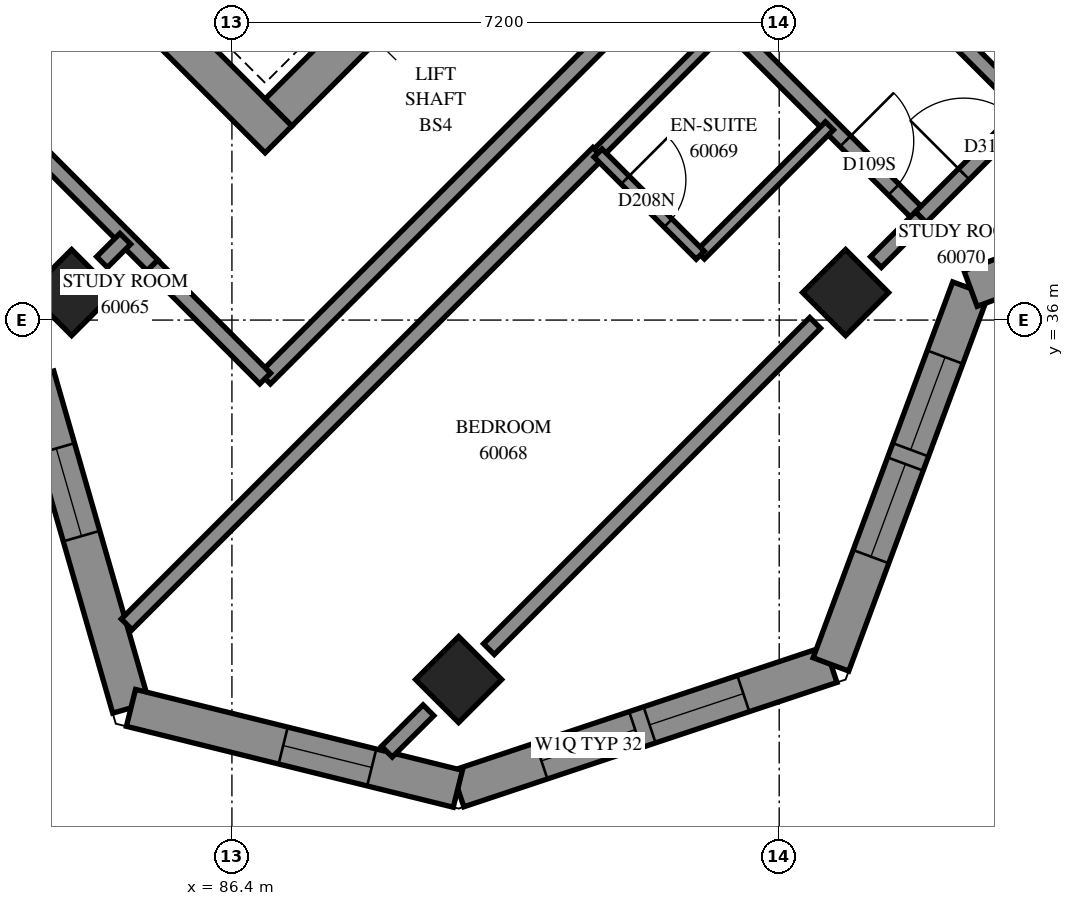
"""IFC4 building model, lengths in metres.
Left out: names, types, materials, properties, quantities, classifications, styles, units other than length and angle.
Written with IfcOpenShell. Run it as: python <this file> out.ifc"""

import sys

from ifc_helpers import new_model, si_unit, direction, frame, frame_2d, origin, origin_2d, place, context, subcontext, project, spatial, polyline, rectangle, outline, extrude, element, fill, save


model = new_model("IFC4")
c1 = context("Model", 3, precision=1e-05, world=origin(), true_north=direction((0.0, 1.0)))
c2 = subcontext(c1, "Body", "Model", "MODEL_VIEW")
j1 = project(units=[si_unit("LENGTHUNIT", "METRE"), si_unit("PLANEANGLEUNIT", "RADIAN")], contexts=[c1])
p1 = place(None, origin())
s1 = spatial("IfcSite", under=j1, at=p1, CompositionType="ELEMENT")
p2 = place(p1, origin())
s2 = spatial("IfcBuilding", under=s1, at=p2, CompositionType="ELEMENT")
p3 = place(p2, frame((0.0, 0.0, 220.2)))
s3 = spatial("IfcBuildingStorey", under=s2, at=p3, CompositionType="ELEMENT", Elevation=220.2)
for number, where, z_axis, x_axis in (
    (1, (84.291, 36.362, 0.0), (0.0, 0.0, 1.0), (0.707, -0.707, 0.0)),
    (2, (94.474, 36.362, 0.0), (0.0, 0.0, 1.0), (0.707, -0.707, 0.0)),
    (3, (89.382, 31.271, 0.0), (0.0, 0.0, 1.0), (0.707, -0.707, 0.0)),
):
    element("IfcColumn", number, at=place(p3, frame(where, z_axis=z_axis, x_axis=x_axis)), inside=s3, PredefinedType="COLUMN", context=c2, shape_type="SweptSolid", body=[
        extrude(rectangle(XDim=0.8, YDim=0.8, at=origin_2d()), origin(), (0.0, 0.0, 1.0), 3.1),
    ])
p4 = place(p3, frame((76.124, 49.267, -0.3), z_axis=(0.0, 0.0, 1.0), x_axis=(0.7071067812, -0.7071067812, 0.0)))
e4 = element("IfcWall", 4, at=p4, inside=s3, PredefinedType="SHEAR", context=c2, shape_type="SweptSolid", body=[
    extrude(rectangle(XDim=15.4, YDim=0.5, at=frame_2d((7.7, 0.0))), origin(), (0.0, 0.0, 1.0), 2.7),
])
p5 = place(p3, frame((87.013, 38.731, -0.3), z_axis=(0.0, 0.0, 1.0), x_axis=(0.7071067812, 0.7071067812, 0.0)))
e5 = element("IfcWall", 5, at=p5, inside=s3, PredefinedType="SHEAR", context=c2, shape_type="SweptSolid", body=[
    extrude(rectangle(XDim=14.4, YDim=0.5, at=frame_2d((7.2, 0.0))), origin(), (0.0, 0.0, 1.0), 2.7),
])
p6 = place(p5, frame((4.55, 0.0, 0.3)))
e6 = element("IfcOpeningElement", 6, at=p6, cuts=e5, PredefinedType="OPENING", context=c2, shape_type="SweptSolid", body=[
    extrude(rectangle(XDim=1.1, YDim=2.1, at=frame_2d((0.55, 1.05))), frame((0.0, 0.26, 0.0), z_axis=(0.0, -1.0, 0.0), x_axis=(1.0, 0.0, 0.0)), (0.0, 0.0, 1.0), 0.52),
])
p7 = place(p5, frame((11.35, 0.0, 0.3)))
e7 = element("IfcOpeningElement", 7, at=p7, cuts=e5, PredefinedType="OPENING", context=c2, shape_type="SweptSolid", body=[
    extrude(rectangle(XDim=1.1, YDim=2.1, at=frame_2d((0.55, 1.05))), frame((0.0, 0.26, 0.0), z_axis=(0.0, -1.0, 0.0), x_axis=(1.0, 0.0, 0.0)), (0.0, 0.0, 1.0), 0.52),
])
p8 = place(p3, frame((89.372, 29.834, 0.0), z_axis=(0.0, 0.0, 1.0), x_axis=(0.9486871632, 0.3162161702, 0.0)))
e8 = element("IfcWall", 8, at=p8, inside=s3, PredefinedType="SOLIDWALL", context=c2, shape_type="SweptSolid", body=[
    extrude(outline(polyline([(-0.072, -0.25), (5.294, -0.25), (5.055, 0.25), (0.072, 0.25), (-0.072, -0.25)])), origin(), (0.0, 0.0, 1.0), 3.1),
])
p9 = place(p8, frame((1.159, 0.0, 0.45)))
e9 = element("IfcOpeningElement", 9, at=p9, cuts=e8, PredefinedType="OPENING", context=c2, shape_type="SweptSolid", body=[
    extrude(rectangle(XDim=1.3, YDim=2.5, at=frame_2d((0.65, 1.25))), frame((0.0, 0.26, 0.0), z_axis=(0.0, -1.0, 0.0), x_axis=(1.0, 0.0, 0.0)), (0.0, 0.0, 1.0), 0.52),
])
p10 = place(p8, frame((2.659, 0.0, 0.45)))
e10 = element("IfcOpeningElement", 10, at=p10, cuts=e8, PredefinedType="OPENING", context=c2, shape_type="SweptSolid", body=[
    extrude(rectangle(XDim=1.3, YDim=2.5, at=frame_2d((0.65, 1.25))), frame((0.0, 0.26, 0.0), z_axis=(0.0, -1.0, 0.0), x_axis=(1.0, 0.0, 0.0)), (0.0, 0.0, 1.0), 0.52),
])
p11 = place(p3, frame((94.281, 31.47, 0.0), z_axis=(0.0, 0.0, 1.0), x_axis=(0.3481903374, 0.9374238577, 0.0)))
e11 = element("IfcWall", 11, at=p11, inside=s3, PredefinedType="SOLIDWALL", context=c2, shape_type="SweptSolid", body=[
    extrude(outline(polyline([(-0.12, -0.25), (5.16, -0.25), (5.39, 0.25), (0.12, 0.25), (-0.12, -0.25)])), origin(), (0.0, 0.0, 1.0), 3.1),
])
p12 = place(p11, frame((1.512, 0.0, 0.45)))
e12 = element("IfcOpeningElement", 12, at=p12, cuts=e11, PredefinedType="OPENING", context=c2, shape_type="SweptSolid", body=[
    extrude(rectangle(XDim=1.3, YDim=2.5, at=frame_2d((0.65, 1.25))), frame((0.0, 0.26, 0.0), z_axis=(0.0, -1.0, 0.0), x_axis=(1.0, 0.0, 0.0)), (0.0, 0.0, 1.0), 0.52),
])
p13 = place(p11, frame((3.012, 0.0, 0.45)))
e13 = element("IfcOpeningElement", 13, at=p13, cuts=e11, PredefinedType="OPENING", context=c2, shape_type="SweptSolid", body=[
    extrude(rectangle(XDim=1.3, YDim=2.5, at=frame_2d((0.65, 1.25))), frame((0.0, 0.26, 0.0), z_axis=(0.0, -1.0, 0.0), x_axis=(1.0, 0.0, 0.0)), (0.0, 0.0, 1.0), 0.52),
])
p14 = place(p3, frame((96.118, 36.415, 0.0), z_axis=(0.0, 0.0, 1.0), x_axis=(0.9374238577, 0.3481903374, 0.0)))
e14 = element("IfcWall", 14, at=p14, inside=s3, PredefinedType="SOLIDWALL", context=c2, shape_type="SweptSolid", body=[
    extrude(outline(polyline([(0.115, -0.25), (5.395, -0.25), (5.155, 0.25), (-0.115, 0.25), (0.115, -0.25)])), origin(), (0.0, 0.0, 1.0), 3.1),
])
p15 = place(p14, frame((1.655, 0.0, 0.45)))
e15 = element("IfcOpeningElement", 15, at=p15, cuts=e14, PredefinedType="OPENING", context=c2, shape_type="SweptSolid", body=[
    extrude(rectangle(XDim=1.3, YDim=2.5, at=frame_2d((0.65, 1.25))), frame((0.0, 0.26, 0.0), z_axis=(0.0, -1.0, 0.0), x_axis=(1.0, 0.0, 0.0)), (0.0, 0.0, 1.0), 0.52),
])
p16 = place(p14, frame((3.155, 0.0, 0.45)))
e16 = element("IfcOpeningElement", 16, at=p16, cuts=e14, PredefinedType="OPENING", context=c2, shape_type="SweptSolid", body=[
    extrude(rectangle(XDim=1.3, YDim=2.5, at=frame_2d((0.65, 1.25))), frame((0.0, 0.26, 0.0), z_axis=(0.0, -1.0, 0.0), x_axis=(1.0, 0.0, 0.0)), (0.0, 0.0, 1.0), 0.52),
])
p17 = place(p3, frame((83.816, 35.261, 0.0), z_axis=(0.0, 0.0, 1.0), x_axis=(0.2766636526, -0.960966817, 0.0)))
e17 = element("IfcWall", 17, at=p17, inside=s3, PredefinedType="SOLIDWALL", context=c2, shape_type="SweptSolid", body=[
    extrude(outline(polyline([(0.138, -0.25), (4.685, -0.25), (4.396, 0.25), (-0.138, 0.25), (0.138, -0.25)])), origin(), (0.0, 0.0, 1.0), 3.1),
])
p18 = place(p17, frame((0.989, 0.0, 0.45)))
e18 = element("IfcOpeningElement", 18, at=p18, cuts=e17, PredefinedType="OPENING", context=c2, shape_type="SweptSolid", body=[
    extrude(rectangle(XDim=1.2, YDim=2.5, at=frame_2d((0.6, 1.25))), frame((0.0, 0.26, 0.0), z_axis=(0.0, -1.0, 0.0), x_axis=(1.0, 0.0, 0.0)), (0.0, 0.0, 1.0), 0.52),
])
p19 = place(p3, frame((85.072, 30.898, 0.0), z_axis=(0.0, 0.0, 1.0), x_axis=(0.9707042236, -0.2402775693, 0.0)))
e19 = element("IfcWall", 19, at=p19, inside=s3, PredefinedType="SOLIDWALL", context=c2, shape_type="SweptSolid", body=[
    extrude(outline(polyline([(-0.144, -0.25), (4.502, -0.25), (4.357, 0.25), (0.144, 0.25), (-0.144, -0.25)])), origin(), (0.0, 0.0, 1.0), 3.1),
])
p20 = place(p19, frame((2.063, 0.0, 0.45)))
e20 = element("IfcOpeningElement", 20, at=p20, cuts=e19, PredefinedType="OPENING", context=c2, shape_type="SweptSolid", body=[
    extrude(rectangle(XDim=1.2, YDim=2.5, at=frame_2d((0.6, 1.25))), frame((0.0, 0.26, 0.0), z_axis=(0.0, -1.0, 0.0), x_axis=(1.0, 0.0, 0.0)), (0.0, 0.0, 1.0), 0.52),
])
p21 = place(p3, frame((85.016, 31.997, 0.0), z_axis=(0.0, 0.0, 1.0), x_axis=(0.7071067812, 0.7071067812, 0.0)))
e21 = element("IfcWall", 21, at=p21, inside=s3, PredefinedType="PARTITIONING", context=c2, shape_type="SweptSolid", body=[
    extrude(rectangle(XDim=8.773, YDim=0.2, at=frame_2d((4.387, 0.0))), origin(), (0.0, 0.0, 1.0), 3.1),
])
p22 = place(p3, frame((86.835, 35.231, 0.0), z_axis=(0.0, 0.0, 1.0), x_axis=(0.7071067812, 0.7071067812, 0.0)))
e22 = element("IfcWall", 22, at=p22, inside=s3, PredefinedType="PARTITIONING", context=c2, shape_type="SweptSolid", body=[
    extrude(rectangle(XDim=7.6, YDim=0.2, at=frame_2d((3.8, 0.0))), origin(), (0.0, 0.0, 1.0), 3.1),
])
p23 = place(p22, frame((6.346, 0.0, 0.0)))
e23 = element("IfcOpeningElement", 23, at=p23, cuts=e22, PredefinedType="OPENING", context=c2, shape_type="SweptSolid", body=[
    extrude(rectangle(XDim=1.0, YDim=2.1, at=frame_2d((0.5, 1.05))), frame((0.0, 0.11, 0.0), z_axis=(0.0, -1.0, 0.0), x_axis=(1.0, 0.0, 0.0)), (0.0, 0.0, 1.0), 0.22),
])
p24 = place(p3, frame((80.522, 41.553, 0.0), z_axis=(0.0, 0.0, 1.0), x_axis=(0.7071067812, -0.7071067812, 0.0)))
e24 = element("IfcWall", 24, at=p24, inside=s3, PredefinedType="PARTITIONING", context=c2, shape_type="SweptSolid", body=[
    extrude(rectangle(XDim=6.836, YDim=0.2, at=frame_2d((3.418, 0.0))), origin(), (0.0, 0.0, 1.0), 3.1),
])
p25 = place(p3, frame((89.781, 31.671, 0.0), z_axis=(0.0, 0.0, 1.0), x_axis=(0.7071067812, 0.7071067812, 0.0)))
e25 = element("IfcWall", 25, at=p25, inside=s3, PredefinedType="PARTITIONING", context=c2, shape_type="SweptSolid", body=[
    extrude(rectangle(XDim=6.07, YDim=0.2, at=frame_2d((3.035, 0.0))), origin(), (0.0, 0.0, 1.0), 2.6),
])
p26 = place(p3, frame((93.623, 42.015, 0.0), z_axis=(0.0, 0.0, 1.0), x_axis=(0.7071067812, -0.7071067812, 0.0)))
e26 = element("IfcWall", 26, at=p26, inside=s3, PredefinedType="PARTITIONING", context=c2, shape_type="SweptSolid", body=[
    extrude(rectangle(XDim=4.599, YDim=0.2, at=frame_2d((2.3, 0.0))), origin(), (0.0, 0.0, 1.0), 3.1),
])
p27 = place(p26, frame((1.349, 0.0, 0.0)))
e27 = element("IfcOpeningElement", 27, at=p27, cuts=e26, PredefinedType="OPENING", context=c2, shape_type="SweptSolid", body=[
    extrude(rectangle(XDim=0.9, YDim=2.1, at=frame_2d((0.45, 1.05))), frame((0.0, 0.11, 0.0), z_axis=(0.0, -1.0, 0.0), x_axis=(1.0, 0.0, 0.0)), (0.0, 0.0, 1.0), 0.22),
])
p28 = place(p3, frame((92.216, 40.608, 0.0), z_axis=(0.0, 0.0, 1.0), x_axis=(0.7071067812, -0.7071067812, 0.0)))
e28 = element("IfcWall", 28, at=p28, inside=s3, PredefinedType="PARTITIONING", context=c2, shape_type="SweptSolid", body=[
    extrude(rectangle(XDim=4.599, YDim=0.2, at=frame_2d((2.3, 0.0))), origin(), (0.0, 0.0, 1.0), 3.1),
])
p29 = place(p28, frame((3.189, 0.0, 0.0)))
e29 = element("IfcOpeningElement", 29, at=p29, cuts=e28, PredefinedType="OPENING", context=c2, shape_type="SweptSolid", body=[
    extrude(rectangle(XDim=0.9, YDim=2.1, at=frame_2d((0.45, 1.05))), frame((0.0, 0.11, 0.0), z_axis=(0.0, -1.0, 0.0), x_axis=(1.0, 0.0, 0.0)), (0.0, 0.0, 1.0), 0.22),
])
for number, where, z_axis, x_axis in (
    (30, (92.563, 36.857, 0.0), (0.0, 0.0, 1.0), (0.707, 0.707, 0.0)),
    (31, (91.219, 38.201, 0.0), (0.0, 0.0, 1.0), (0.707, 0.707, 0.0)),
):
    element("IfcWall", number, at=place(p3, frame(where, z_axis=z_axis, x_axis=x_axis)), inside=s3, PredefinedType="PARTITIONING", context=c2, shape_type="SweptSolid", body=[
        extrude(rectangle(XDim=2.401, YDim=0.15, at=frame_2d((1.201, 0.0))), origin(), (0.0, 0.0, 1.0), 3.1),
    ])
p30 = place(p3, frame((85.353, 36.717, 0.0), z_axis=(0.0, 0.0, 1.0), x_axis=(0.7066304548, -0.7075827869, 0.0)))
e32 = element("IfcWall", 32, at=p30, inside=s3, PredefinedType="PARTITIONING", context=c2, shape_type="SweptSolid", body=[
    extrude(rectangle(XDim=2.1, YDim=0.2, at=frame_2d((1.05, 0.0))), origin(), (0.0, 0.0, 1.0), 3.1),
])
p31 = place(p3, frame((95.463, 37.353, 0.0), z_axis=(0.0, 0.0, 1.0), x_axis=(0.7071067812, 0.7071067812, 0.0)))
e33 = element("IfcWall", 33, at=p31, inside=s3, PredefinedType="PARTITIONING", context=c2, shape_type="SweptSolid", body=[
    extrude(rectangle(XDim=2.0, YDim=0.2, at=frame_2d((1.0, 0.0))), origin(), (0.0, 0.0, 1.0), 2.6),
])
p32 = place(p31, frame((0.802, 0.0, 0.0)))
e34 = element("IfcOpeningElement", 34, at=p32, cuts=e33, PredefinedType="OPENING", context=c2, shape_type="SweptSolid", body=[
    extrude(rectangle(XDim=1.0, YDim=2.1, at=frame_2d((0.5, 1.05))), frame((0.0, 0.11, 0.0), z_axis=(0.0, -1.0, 0.0), x_axis=(1.0, 0.0, 0.0)), (0.0, 0.0, 1.0), 0.22),
])
p33 = place(p3, frame((91.217, 38.197, 0.0), z_axis=(0.0, 0.0, 1.0), x_axis=(0.7071067812, -0.7071067812, 0.0)))
e35 = element("IfcWall", 35, at=p33, inside=s3, PredefinedType="PARTITIONING", context=c2, shape_type="SweptSolid", body=[
    extrude(rectangle(XDim=1.901, YDim=0.15, at=frame_2d((0.95, 0.0))), origin(), (0.0, 0.0, 1.0), 3.1),
])
p34 = place(p33, frame((0.502, 0.0, 0.0)))
e36 = element("IfcOpeningElement", 36, at=p34, cuts=e35, PredefinedType="OPENING", context=c2, shape_type="SweptSolid", body=[
    extrude(rectangle(XDim=0.8, YDim=2.1, at=frame_2d((0.4, 1.05))), frame((0.0, 0.085, 0.0), z_axis=(0.0, -1.0, 0.0), x_axis=(1.0, 0.0, 0.0)), (0.0, 0.0, 1.0), 0.17),
])
p35 = place(p3, frame((94.873, 36.763, 0.0), z_axis=(0.0, 0.0, 1.0), x_axis=(0.7071067812, 0.7071067812, 0.0)))
e37 = element("IfcWall", 37, at=p35, inside=s3, PredefinedType="PARTITIONING", context=c2, shape_type="SweptSolid", body=[
    extrude(rectangle(XDim=0.834, YDim=0.2, at=frame_2d((0.417, 0.0))), origin(), (0.0, 0.0, 1.0), 2.6),
])
p36 = place(p3, frame((88.439, 30.322, 0.0), z_axis=(0.0, 0.0, 1.0), x_axis=(0.7085960355, 0.7056143837, 0.0)))
e38 = element("IfcWall", 38, at=p36, inside=s3, PredefinedType="PARTITIONING", context=c2, shape_type="SweptSolid", body=[
    extrude(rectangle(XDim=0.771, YDim=0.2, at=frame_2d((0.386, 0.0))), origin(), (0.0, 0.0, 1.0), 3.1),
])
p37 = place(p3, frame((84.691, 36.763, 0.0), z_axis=(0.0, 0.0, 1.0), x_axis=(0.7071067812, 0.7071067812, 0.0)))
e39 = element("IfcWall", 39, at=p37, inside=s3, PredefinedType="PARTITIONING", context=c2, shape_type="SweptSolid", body=[
    extrude(rectangle(XDim=0.433, YDim=0.2, at=frame_2d((0.216, 0.0))), origin(), (0.0, 0.0, 1.0), 3.1),
])
p38 = place(p9, origin())
e40 = element("IfcWindow", 40, at=p38, inside=s3, PartitioningType="SINGLE_PANEL", PredefinedType="WINDOW", context=c2, shape_type="SweptSolid", body=[
    extrude(rectangle(XDim=1.3, YDim=2.5, at=frame_2d((0.65, 1.25))), frame((0.0, 0.18, 0.0), z_axis=(0.0, -1.0, 0.0), x_axis=(1.0, 0.0, 0.0)), (0.0, 0.0, 1.0), 0.06),
])
fill(e9, e40)
p39 = place(p10, origin())
e41 = element("IfcWindow", 41, at=p39, inside=s3, PartitioningType="SINGLE_PANEL", PredefinedType="WINDOW", context=c2, shape_type="SweptSolid", body=[
    extrude(rectangle(XDim=1.3, YDim=2.5, at=frame_2d((0.65, 1.25))), frame((0.0, 0.18, 0.0), z_axis=(0.0, -1.0, 0.0), x_axis=(1.0, 0.0, 0.0)), (0.0, 0.0, 1.0), 0.06),
])
fill(e10, e41)
p40 = place(p12, origin())
e42 = element("IfcWindow", 42, at=p40, inside=s3, PartitioningType="SINGLE_PANEL", PredefinedType="WINDOW", context=c2, shape_type="SweptSolid", body=[
    extrude(rectangle(XDim=1.3, YDim=2.5, at=frame_2d((0.65, 1.25))), frame((0.0, 0.18, 0.0), z_axis=(0.0, -1.0, 0.0), x_axis=(1.0, 0.0, 0.0)), (0.0, 0.0, 1.0), 0.06),
])
fill(e12, e42)
p41 = place(p13, origin())
e43 = element("IfcWindow", 43, at=p41, inside=s3, PartitioningType="SINGLE_PANEL", PredefinedType="WINDOW", context=c2, shape_type="SweptSolid", body=[
    extrude(rectangle(XDim=1.3, YDim=2.5, at=frame_2d((0.65, 1.25))), frame((0.0, 0.18, 0.0), z_axis=(0.0, -1.0, 0.0), x_axis=(1.0, 0.0, 0.0)), (0.0, 0.0, 1.0), 0.06),
])
fill(e13, e43)
p42 = place(p18, origin())
e44 = element("IfcWindow", 44, at=p42, inside=s3, PartitioningType="SINGLE_PANEL", PredefinedType="WINDOW", context=c2, shape_type="SweptSolid", body=[
    extrude(rectangle(XDim=1.2, YDim=2.5, at=frame_2d((0.6, 1.25))), frame((0.0, 0.18, 0.0), z_axis=(0.0, -1.0, 0.0), x_axis=(1.0, 0.0, 0.0)), (0.0, 0.0, 1.0), 0.06),
])
fill(e18, e44)
p43 = place(p20, origin())
e45 = element("IfcWindow", 45, at=p43, inside=s3, PartitioningType="SINGLE_PANEL", PredefinedType="WINDOW", context=c2, shape_type="SweptSolid", body=[
    extrude(rectangle(XDim=1.2, YDim=2.5, at=frame_2d((0.6, 1.25))), frame((0.0, 0.18, 0.0), z_axis=(0.0, -1.0, 0.0), x_axis=(1.0, 0.0, 0.0)), (0.0, 0.0, 1.0), 0.06),
])
fill(e20, e45)
p44 = place(p29, origin())
e46 = element("IfcDoor", 46, at=p44, inside=s3, OperationType="SINGLE_SWING_LEFT", PredefinedType="DOOR", context=c2, shape_type="SweptSolid", body=[
    extrude(rectangle(XDim=0.9, YDim=2.1, at=frame_2d((0.45, 1.05))), frame((0.0, 0.025, 0.0), z_axis=(0.0, -1.0, 0.0), x_axis=(1.0, 0.0, 0.0)), (0.0, 0.0, 1.0), 0.05),
])
fill(e29, e46)
p45 = place(p34, origin())
e47 = element("IfcDoor", 47, at=p45, inside=s3, OperationType="SINGLE_SWING_RIGHT", PredefinedType="DOOR", context=c2, shape_type="SweptSolid", body=[
    extrude(rectangle(XDim=0.8, YDim=2.1, at=frame_2d((0.4, 1.05))), frame((0.0, 0.025, 0.0), z_axis=(0.0, -1.0, 0.0), x_axis=(1.0, 0.0, 0.0)), (0.0, 0.0, 1.0), 0.05),
])
fill(e36, e47)
p46 = place(p32, origin())
e48 = element("IfcDoor", 48, at=p46, inside=s3, OperationType="SINGLE_SWING_RIGHT", PredefinedType="DOOR", context=c2, shape_type="SweptSolid", body=[
    extrude(rectangle(XDim=1.0, YDim=2.1, at=frame_2d((0.5, 1.05))), frame((0.0, 0.025, 0.0), z_axis=(0.0, -1.0, 0.0), x_axis=(1.0, 0.0, 0.0)), (0.0, 0.0, 1.0), 0.05),
])
fill(e34, e48)
save(model, sys.argv[1])
